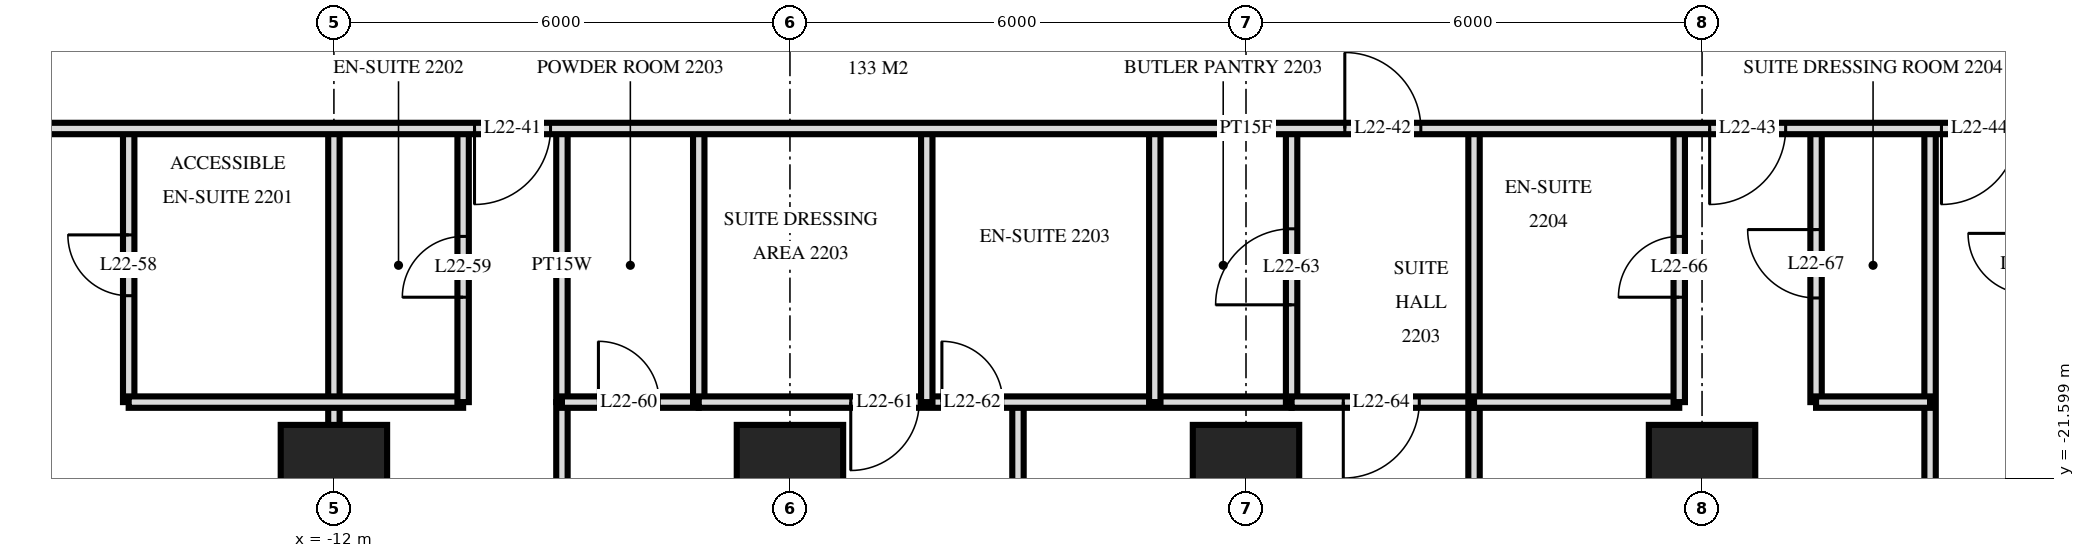
"""IFC4 building model, lengths in metres.
Left out: names, types, materials, properties, quantities, classifications, styles, units other than length and angle.
Written with IfcOpenShell. Run it as: python <this file> out.ifc"""

import sys

from ifc_helpers import new_model, si_unit, direction, frame, frame_2d, origin, origin_2d, place, context, subcontext, project, spatial, rectangle, extrude, element, fill, save


model = new_model("IFC4")
c1 = context("Model", 3, precision=1e-05, world=origin(), true_north=direction((0.0, 1.0)))
c2 = subcontext(c1, "Body", "Model", "MODEL_VIEW")
j1 = project(units=[si_unit("LENGTHUNIT", "METRE"), si_unit("PLANEANGLEUNIT", "RADIAN")], contexts=[c1])
p1 = place(None, origin())
s1 = spatial("IfcSite", under=j1, at=p1, CompositionType="ELEMENT")
p2 = place(p1, origin())
s2 = spatial("IfcBuilding", under=s1, at=p2, CompositionType="ELEMENT")
p3 = place(p2, frame((0.0, 0.0, 88.8)))
s3 = spatial("IfcBuildingStorey", under=s2, at=p3, CompositionType="ELEMENT", Elevation=88.8)
for number, where, z_axis, x_axis in (
    (1, (-12.0, -21.6, 0.0), (0.0, 0.0, 1.0), (1.0, 0.0, 0.0)),
    (2, (-6.0, -21.6, 0.0), (0.0, 0.0, 1.0), (1.0, 0.0, 0.0)),
    (3, (0.0, -21.6, 0.0), (0.0, 0.0, 1.0), (1.0, 0.0, 0.0)),
    (4, (6.0, -21.6, 0.0), (0.0, 0.0, 1.0), (1.0, 0.0, 0.0)),
):
    element("IfcColumn", number, at=place(p3, frame(where, z_axis=z_axis, x_axis=x_axis)), inside=s3, PredefinedType="COLUMN", context=c2, shape_type="SweptSolid", body=[
        extrude(rectangle(XDim=1.4, YDim=1.4, at=origin_2d()), origin(), (0.0, 0.0, 1.0), 3.6),
    ])
p4 = place(p3, frame((9.0, -29.22, 0.0), z_axis=(0.0, 0.0, 1.0), x_axis=(0.0, 1.0, 0.0)))
e5 = element("IfcWall", 5, at=p4, inside=s3, PredefinedType="PARTITIONING", context=c2, shape_type="SweptSolid", body=[
    extrude(rectangle(XDim=12.22, YDim=0.15, at=frame_2d((6.11, 0.0))), origin(), (0.0, 0.0, 1.0), 3.32),
])
p5 = place(p3, frame((7.5, -20.6, 0.0), z_axis=(0.0, 0.0, 1.0), x_axis=(0.0, 1.0, 0.0)))
e6 = element("IfcWall", 6, at=p5, inside=s3, PredefinedType="PARTITIONING", context=c2, shape_type="SweptSolid", body=[
    extrude(rectangle(XDim=3.6, YDim=0.15, at=frame_2d((1.8, 0.0))), origin(), (0.0, 0.0, 1.0), 3.32),
])
p6 = place(p5, frame((1.37, 0.0, 0.0)))
e7 = element("IfcOpeningElement", 7, at=p6, cuts=e6, PredefinedType="OPENING", context=c2, shape_type="SweptSolid", body=[
    extrude(rectangle(XDim=0.9, YDim=2.1, at=frame_2d((0.45, 1.05))), frame((0.0, 0.085, 0.0), z_axis=(0.0, -1.0, 0.0), x_axis=(1.0, 0.0, 0.0)), (0.0, 0.0, 1.0), 0.17),
])
p7 = place(p3, frame((5.7, -20.6, 0.0), z_axis=(0.0, 0.0, 1.0), x_axis=(0.0, 1.0, 0.0)))
e8 = element("IfcWall", 8, at=p7, inside=s3, PredefinedType="PARTITIONING", context=c2, shape_type="SweptSolid", body=[
    extrude(rectangle(XDim=3.6, YDim=0.15, at=frame_2d((1.8, 0.0))), origin(), (0.0, 0.0, 1.0), 3.32),
])
p8 = place(p7, frame((1.38, 0.0, 0.0)))
e9 = element("IfcOpeningElement", 9, at=p8, cuts=e8, PredefinedType="OPENING", context=c2, shape_type="SweptSolid", body=[
    extrude(rectangle(XDim=0.8, YDim=2.1, at=frame_2d((0.4, 1.05))), frame((0.0, 0.085, 0.0), z_axis=(0.0, -1.0, 0.0), x_axis=(1.0, 0.0, 0.0)), (0.0, 0.0, 1.0), 0.17),
])
p9 = place(p3, frame((3.0, -20.6, 0.0), z_axis=(0.0, 0.0, 1.0), x_axis=(0.0, 1.0, 0.0)))
e10 = element("IfcWall", 10, at=p9, inside=s3, PredefinedType="PARTITIONING", context=c2, shape_type="SweptSolid", body=[
    extrude(rectangle(XDim=3.6, YDim=0.15, at=frame_2d((1.8, 0.0))), origin(), (0.0, 0.0, 1.0), 3.32),
])
p10 = place(p3, frame((3.0, -29.22, 0.0), z_axis=(0.0, 0.0, 1.0), x_axis=(0.0, 1.0, 0.0)))
e11 = element("IfcWall", 11, at=p10, inside=s3, PredefinedType="PARTITIONING", context=c2, shape_type="SweptSolid", body=[
    extrude(rectangle(XDim=8.62, YDim=0.15, at=frame_2d((4.31, 0.0))), origin(), (0.0, 0.0, 1.0), 3.32),
])
p11 = place(p3, frame((0.6, -20.6, 0.0), z_axis=(0.0, 0.0, 1.0), x_axis=(0.0, 1.0, 0.0)))
e12 = element("IfcWall", 12, at=p11, inside=s3, PredefinedType="PARTITIONING", context=c2, shape_type="SweptSolid", body=[
    extrude(rectangle(XDim=3.6, YDim=0.15, at=frame_2d((1.8, 0.0))), origin(), (0.0, 0.0, 1.0), 3.32),
])
p12 = place(p11, frame((1.28, 0.0, 0.0)))
e13 = element("IfcOpeningElement", 13, at=p12, cuts=e12, PredefinedType="OPENING", context=c2, shape_type="SweptSolid", body=[
    extrude(rectangle(XDim=1.0, YDim=2.1, at=frame_2d((0.5, 1.05))), frame((0.0, 0.085, 0.0), z_axis=(0.0, -1.0, 0.0), x_axis=(1.0, 0.0, 0.0)), (0.0, 0.0, 1.0), 0.17),
])
p13 = place(p3, frame((-1.2, -20.6, 0.0), z_axis=(0.0, 0.0, 1.0), x_axis=(0.0, 1.0, 0.0)))
e14 = element("IfcWall", 14, at=p13, inside=s3, PredefinedType="PARTITIONING", context=c2, shape_type="SweptSolid", body=[
    extrude(rectangle(XDim=3.6, YDim=0.15, at=frame_2d((1.8, 0.0))), origin(), (0.0, 0.0, 1.0), 3.32),
])
p14 = place(p3, frame((-3.0, -29.22, 0.0), z_axis=(0.0, 0.0, 1.0), x_axis=(0.0, 1.0, 0.0)))
e15 = element("IfcWall", 15, at=p14, inside=s3, PredefinedType="PARTITIONING", context=c2, shape_type="SweptSolid", body=[
    extrude(rectangle(XDim=8.62, YDim=0.15, at=frame_2d((4.31, 0.0))), origin(), (0.0, 0.0, 1.0), 3.32),
])
p15 = place(p14, frame((3.77, 0.0, 0.0)))
e16 = element("IfcOpeningElement", 16, at=p15, cuts=e15, PredefinedType="OPENING", context=c2, shape_type="SweptSolid", body=[
    extrude(rectangle(XDim=0.9, YDim=2.1, at=frame_2d((0.45, 1.05))), frame((0.0, 0.085, 0.0), z_axis=(0.0, -1.0, 0.0), x_axis=(1.0, 0.0, 0.0)), (0.0, 0.0, 1.0), 0.17),
])
p16 = place(p3, frame((-4.2, -20.6, 0.0), z_axis=(0.0, 0.0, 1.0), x_axis=(0.0, 1.0, 0.0)))
e17 = element("IfcWall", 17, at=p16, inside=s3, PredefinedType="PARTITIONING", context=c2, shape_type="SweptSolid", body=[
    extrude(rectangle(XDim=3.6, YDim=0.15, at=frame_2d((1.8, 0.0))), origin(), (0.0, 0.0, 1.0), 3.32),
])
p17 = place(p3, frame((-7.2, -20.6, 0.0), z_axis=(0.0, 0.0, 1.0), x_axis=(0.0, 1.0, 0.0)))
e18 = element("IfcWall", 18, at=p17, inside=s3, PredefinedType="PLUMBINGWALL", context=c2, shape_type="SweptSolid", body=[
    extrude(rectangle(XDim=3.6, YDim=0.15, at=frame_2d((1.8, 0.0))), origin(), (0.0, 0.0, 1.0), 3.32),
])
p18 = place(p3, frame((-9.0, -29.22, 0.0), z_axis=(0.0, 0.0, 1.0), x_axis=(0.0, 1.0, 0.0)))
e19 = element("IfcWall", 19, at=p18, inside=s3, PredefinedType="PARTITIONING", context=c2, shape_type="SweptSolid", body=[
    extrude(rectangle(XDim=8.62, YDim=0.15, at=frame_2d((4.31, 0.0))), origin(), (0.0, 0.0, 1.0), 3.32),
])
p19 = place(p3, frame((-9.0, -20.6, 0.0), z_axis=(0.0, 0.0, 1.0), x_axis=(0.0, 1.0, 0.0)))
e20 = element("IfcWall", 20, at=p19, inside=s3, PredefinedType="PLUMBINGWALL", context=c2, shape_type="SweptSolid", body=[
    extrude(rectangle(XDim=3.6, YDim=0.15, at=frame_2d((1.8, 0.0))), origin(), (0.0, 0.0, 1.0), 3.32),
])
p20 = place(p3, frame((-10.3, -20.6, 0.0), z_axis=(0.0, 0.0, 1.0), x_axis=(0.0, 1.0, 0.0)))
e21 = element("IfcWall", 21, at=p20, inside=s3, PredefinedType="PARTITIONING", context=c2, shape_type="SweptSolid", body=[
    extrude(rectangle(XDim=3.6, YDim=0.15, at=frame_2d((1.8, 0.0))), origin(), (0.0, 0.0, 1.0), 3.32),
])
p21 = place(p20, frame((1.38, 0.0, 0.0)))
e22 = element("IfcOpeningElement", 22, at=p21, cuts=e21, PredefinedType="OPENING", context=c2, shape_type="SweptSolid", body=[
    extrude(rectangle(XDim=0.8, YDim=2.1, at=frame_2d((0.4, 1.05))), frame((0.0, 0.085, 0.0), z_axis=(0.0, -1.0, 0.0), x_axis=(1.0, 0.0, 0.0)), (0.0, 0.0, 1.0), 0.17),
])
p22 = place(p3, frame((-12.0, -29.22, 0.0), z_axis=(0.0, 0.0, 1.0), x_axis=(0.0, 1.0, 0.0)))
e23 = element("IfcWall", 23, at=p22, inside=s3, PredefinedType="PARTITIONING", context=c2, shape_type="SweptSolid", body=[
    extrude(rectangle(XDim=12.22, YDim=0.15, at=frame_2d((6.11, 0.0))), origin(), (0.0, 0.0, 1.0), 3.32),
])
p23 = place(p3, frame((-14.7, -20.6, 0.0), z_axis=(0.0, 0.0, 1.0), x_axis=(0.0, 1.0, 0.0)))
e24 = element("IfcWall", 24, at=p23, inside=s3, PredefinedType="PARTITIONING", context=c2, shape_type="SweptSolid", body=[
    extrude(rectangle(XDim=3.6, YDim=0.15, at=frame_2d((1.8, 0.0))), origin(), (0.0, 0.0, 1.0), 3.32),
])
p24 = place(p23, frame((1.4, 0.0, 0.0)))
e25 = element("IfcOpeningElement", 25, at=p24, cuts=e24, PredefinedType="OPENING", context=c2, shape_type="SweptSolid", body=[
    extrude(rectangle(XDim=0.8, YDim=2.1, at=frame_2d((0.4, 1.05))), frame((0.0, 0.085, 0.0), z_axis=(0.0, -1.0, 0.0), x_axis=(1.0, 0.0, 0.0)), (0.0, 0.0, 1.0), 0.17),
])
p25 = place(p3, frame((0.6, -20.6, 0.0), z_axis=(0.0, 0.0, 1.0), x_axis=(1.0, 0.0, 0.0)))
e26 = element("IfcWall", 26, at=p25, inside=s3, PredefinedType="PARTITIONING", context=c2, shape_type="SweptSolid", body=[
    extrude(rectangle(XDim=2.4, YDim=0.15, at=frame_2d((1.2, 0.0))), origin(), (0.0, 0.0, 1.0), 3.32),
])
p26 = place(p25, frame((0.68, 0.0, 0.0)))
e27 = element("IfcOpeningElement", 27, at=p26, cuts=e26, PredefinedType="OPENING", context=c2, shape_type="SweptSolid", body=[
    extrude(rectangle(XDim=1.0, YDim=2.1, at=frame_2d((0.5, 1.05))), frame((0.0, 0.085, 0.0), z_axis=(0.0, -1.0, 0.0), x_axis=(1.0, 0.0, 0.0)), (0.0, 0.0, 1.0), 0.17),
])
p27 = place(p3, frame((-14.7, -20.6, 0.0), z_axis=(0.0, 0.0, 1.0), x_axis=(1.0, 0.0, 0.0)))
e28 = element("IfcWall", 28, at=p27, inside=s3, PredefinedType="PARTITIONING", context=c2, shape_type="SweptSolid", body=[
    extrude(rectangle(XDim=4.4, YDim=0.15, at=frame_2d((2.2, 0.0))), origin(), (0.0, 0.0, 1.0), 3.32),
])
p28 = place(p3, frame((-7.2, -20.6, 0.0), z_axis=(0.0, 0.0, 1.0), x_axis=(1.0, 0.0, 0.0)))
e29 = element("IfcWall", 29, at=p28, inside=s3, PredefinedType="PARTITIONING", context=c2, shape_type="SweptSolid", body=[
    extrude(rectangle(XDim=7.8, YDim=0.15, at=frame_2d((3.9, 0.0))), origin(), (0.0, 0.0, 1.0), 3.32),
])
p29 = place(p28, frame((2.0, 0.0, 0.0)))
e30 = element("IfcOpeningElement", 30, at=p29, cuts=e29, PredefinedType="OPENING", context=c2, shape_type="SweptSolid", body=[
    extrude(rectangle(XDim=0.9, YDim=2.1, at=frame_2d((0.45, 1.05))), frame((0.0, 0.085, 0.0), z_axis=(0.0, -1.0, 0.0), x_axis=(1.0, 0.0, 0.0)), (0.0, 0.0, 1.0), 0.17),
])
p30 = place(p28, frame((3.199, 0.0, 0.0)))
e31 = element("IfcOpeningElement", 31, at=p30, cuts=e29, PredefinedType="OPENING", context=c2, shape_type="SweptSolid", body=[
    extrude(rectangle(XDim=0.8, YDim=2.1, at=frame_2d((0.4, 1.05))), frame((0.0, 0.085, 0.0), z_axis=(0.0, -1.0, 0.0), x_axis=(1.0, 0.0, 0.0)), (0.0, 0.0, 1.0), 0.17),
])
p31 = place(p3, frame((3.0, -20.6, 0.0), z_axis=(0.0, 0.0, 1.0), x_axis=(1.0, 0.0, 0.0)))
e32 = element("IfcWall", 32, at=p31, inside=s3, PredefinedType="PARTITIONING", context=c2, shape_type="SweptSolid", body=[
    extrude(rectangle(XDim=2.7, YDim=0.15, at=frame_2d((1.35, 0.0))), origin(), (0.0, 0.0, 1.0), 3.32),
])
p32 = place(p3, frame((7.5, -20.6, 0.0), z_axis=(0.0, 0.0, 1.0), x_axis=(1.0, 0.0, 0.0)))
e33 = element("IfcWall", 33, at=p32, inside=s3, PredefinedType="PARTITIONING", context=c2, shape_type="SweptSolid", body=[
    extrude(rectangle(XDim=1.5, YDim=0.15, at=frame_2d((0.75, 0.0))), origin(), (0.0, 0.0, 1.0), 3.32),
])
p33 = place(p3, frame((-9.0, -20.6, 0.0), z_axis=(0.0, 0.0, 1.0), x_axis=(1.0, 0.0, 0.0)))
e34 = element("IfcWall", 34, at=p33, inside=s3, PredefinedType="PLUMBINGWALL", context=c2, shape_type="SweptSolid", body=[
    extrude(rectangle(XDim=1.8, YDim=0.15, at=frame_2d((0.9, 0.0))), origin(), (0.0, 0.0, 1.0), 3.32),
])
p34 = place(p33, frame((0.48, 0.0, 0.0)))
e35 = element("IfcOpeningElement", 35, at=p34, cuts=e34, PredefinedType="OPENING", context=c2, shape_type="SweptSolid", body=[
    extrude(rectangle(XDim=0.8, YDim=2.1, at=frame_2d((0.4, 1.05))), frame((0.0, 0.085, 0.0), z_axis=(0.0, -1.0, 0.0), x_axis=(1.0, 0.0, 0.0)), (0.0, 0.0, 1.0), 0.17),
])
p35 = place(p3, frame((-33.12, -17.0, 0.0), z_axis=(0.0, 0.0, 1.0), x_axis=(1.0, 0.0, 0.0)))
e36 = element("IfcWall", 36, at=p35, inside=s3, PredefinedType="PARTITIONING", context=c2, shape_type="SweptSolid", body=[
    extrude(rectangle(XDim=66.24, YDim=0.15, at=frame_2d((33.12, 0.0))), origin(), (0.0, 0.0, 1.0), 3.32),
])
p36 = place(p35, frame((16.27, 0.0, 0.0)))
e37 = element("IfcOpeningElement", 37, at=p36, cuts=e36, PredefinedType="OPENING", context=c2, shape_type="SweptSolid", body=[
    extrude(rectangle(XDim=1.0, YDim=2.1, at=frame_2d((0.5, 1.05))), frame((0.0, 0.085, 0.0), z_axis=(0.0, -1.0, 0.0), x_axis=(1.0, 0.0, 0.0)), (0.0, 0.0, 1.0), 0.17),
])
p37 = place(p35, frame((22.97, 0.0, 0.0)))
e38 = element("IfcOpeningElement", 38, at=p37, cuts=e36, PredefinedType="OPENING", context=c2, shape_type="SweptSolid", body=[
    extrude(rectangle(XDim=1.0, YDim=2.1, at=frame_2d((0.5, 1.05))), frame((0.0, 0.085, 0.0), z_axis=(0.0, -1.0, 0.0), x_axis=(1.0, 0.0, 0.0)), (0.0, 0.0, 1.0), 0.17),
])
p38 = place(p35, frame((34.42, 0.0, 0.0)))
e39 = element("IfcOpeningElement", 39, at=p38, cuts=e36, PredefinedType="OPENING", context=c2, shape_type="SweptSolid", body=[
    extrude(rectangle(XDim=1.0, YDim=2.1, at=frame_2d((0.5, 1.05))), frame((0.0, 0.085, 0.0), z_axis=(0.0, -1.0, 0.0), x_axis=(1.0, 0.0, 0.0)), (0.0, 0.0, 1.0), 0.17),
])
p39 = place(p35, frame((39.22, 0.0, 0.0)))
e40 = element("IfcOpeningElement", 40, at=p39, cuts=e36, PredefinedType="OPENING", context=c2, shape_type="SweptSolid", body=[
    extrude(rectangle(XDim=1.0, YDim=2.1, at=frame_2d((0.5, 1.05))), frame((0.0, 0.085, 0.0), z_axis=(0.0, -1.0, 0.0), x_axis=(1.0, 0.0, 0.0)), (0.0, 0.0, 1.0), 0.17),
])
p40 = place(p35, frame((42.27, 0.0, 0.0)))
e41 = element("IfcOpeningElement", 41, at=p40, cuts=e36, PredefinedType="OPENING", context=c2, shape_type="SweptSolid", body=[
    extrude(rectangle(XDim=1.0, YDim=2.1, at=frame_2d((0.5, 1.05))), frame((0.0, 0.085, 0.0), z_axis=(0.0, -1.0, 0.0), x_axis=(1.0, 0.0, 0.0)), (0.0, 0.0, 1.0), 0.17),
])
p41 = place(p35, frame((45.82, 0.0, 0.0)))
e42 = element("IfcOpeningElement", 42, at=p41, cuts=e36, PredefinedType="OPENING", context=c2, shape_type="SweptSolid", body=[
    extrude(rectangle(XDim=1.0, YDim=2.1, at=frame_2d((0.5, 1.05))), frame((0.0, 0.085, 0.0), z_axis=(0.0, -1.0, 0.0), x_axis=(1.0, 0.0, 0.0)), (0.0, 0.0, 1.0), 0.17),
])
p42 = place(p35, frame((13.42, 0.0, 0.0)))
e43 = element("IfcOpeningElement", 43, at=p42, cuts=e36, PredefinedType="OPENING", context=c2, shape_type="SweptSolid", body=[
    extrude(rectangle(XDim=1.0, YDim=2.1, at=frame_2d((0.5, 1.05))), frame((0.0, 0.085, 0.0), z_axis=(0.0, -1.0, 0.0), x_axis=(1.0, 0.0, 0.0)), (0.0, 0.0, 1.0), 0.17),
])
p43 = place(p35, frame((54.82, 0.0, 0.0)))
e44 = element("IfcOpeningElement", 44, at=p43, cuts=e36, PredefinedType="OPENING", context=c2, shape_type="SweptSolid", body=[
    extrude(rectangle(XDim=1.0, YDim=2.1, at=frame_2d((0.5, 1.05))), frame((0.0, 0.085, 0.0), z_axis=(0.0, -1.0, 0.0), x_axis=(1.0, 0.0, 0.0)), (0.0, 0.0, 1.0), 0.17),
])
p44 = place(p37, frame((0.5, 0.0, 0.0), z_axis=(0.0, 0.0, 1.0), x_axis=(-1.0, 0.0, 0.0)))
e45 = element("IfcDoor", 45, at=p44, inside=s3, OperationType="SINGLE_SWING_LEFT", PredefinedType="DOOR", context=c2, shape_type="SweptSolid", body=[
    extrude(rectangle(XDim=1.0, YDim=2.1, at=frame_2d((0.0, 1.05))), frame((0.0, -0.025, 0.0), z_axis=(0.0, 1.0, 0.0), x_axis=(-1.0, 0.0, 0.0)), (0.0, 0.0, 1.0), 0.05),
])
fill(e38, e45)
p45 = place(p38, origin())
e46 = element("IfcDoor", 46, at=p45, inside=s3, OperationType="SINGLE_SWING_RIGHT", PredefinedType="DOOR", context=c2, shape_type="SweptSolid", body=[
    extrude(rectangle(XDim=1.0, YDim=2.1, at=frame_2d((0.5, 1.05))), frame((0.0, 0.025, 0.0), z_axis=(0.0, -1.0, 0.0), x_axis=(1.0, 0.0, 0.0)), (0.0, 0.0, 1.0), 0.05),
])
fill(e39, e46)
p46 = place(p39, frame((0.5, 0.0, 0.0), z_axis=(0.0, 0.0, 1.0), x_axis=(-1.0, 0.0, 0.0)))
e47 = element("IfcDoor", 47, at=p46, inside=s3, OperationType="SINGLE_SWING_LEFT", PredefinedType="DOOR", context=c2, shape_type="SweptSolid", body=[
    extrude(rectangle(XDim=1.0, YDim=2.1, at=frame_2d((0.0, 1.05))), frame((0.0, -0.025, 0.0), z_axis=(0.0, 1.0, 0.0), x_axis=(-1.0, 0.0, 0.0)), (0.0, 0.0, 1.0), 0.05),
])
fill(e40, e47)
p47 = place(p40, frame((0.5, 0.0, 0.0), z_axis=(0.0, 0.0, 1.0), x_axis=(-1.0, 0.0, 0.0)))
e48 = element("IfcDoor", 48, at=p47, inside=s3, OperationType="SINGLE_SWING_LEFT", PredefinedType="DOOR", context=c2, shape_type="SweptSolid", body=[
    extrude(rectangle(XDim=1.0, YDim=2.1, at=frame_2d((0.0, 1.05))), frame((0.0, -0.025, 0.0), z_axis=(0.0, 1.0, 0.0), x_axis=(-1.0, 0.0, 0.0)), (0.0, 0.0, 1.0), 0.05),
])
fill(e41, e48)
p48 = place(p24, origin())
e49 = element("IfcDoor", 49, at=p48, inside=s3, OperationType="SINGLE_SWING_LEFT", PredefinedType="DOOR", context=c2, shape_type="SweptSolid", body=[
    extrude(rectangle(XDim=0.8, YDim=2.1, at=frame_2d((0.4, 1.05))), frame((0.0, 0.025, 0.0), z_axis=(0.0, -1.0, 0.0), x_axis=(1.0, 0.0, 0.0)), (0.0, 0.0, 1.0), 0.05),
])
fill(e25, e49)
p49 = place(p21, origin())
e50 = element("IfcDoor", 50, at=p49, inside=s3, OperationType="SINGLE_SWING_RIGHT", PredefinedType="DOOR", context=c2, shape_type="SweptSolid", body=[
    extrude(rectangle(XDim=0.8, YDim=2.1, at=frame_2d((0.4, 1.05))), frame((0.0, 0.025, 0.0), z_axis=(0.0, -1.0, 0.0), x_axis=(1.0, 0.0, 0.0)), (0.0, 0.0, 1.0), 0.05),
])
fill(e22, e50)
p50 = place(p34, origin())
e51 = element("IfcDoor", 51, at=p50, inside=s3, OperationType="SINGLE_SWING_RIGHT", PredefinedType="DOOR", context=c2, shape_type="SweptSolid", body=[
    extrude(rectangle(XDim=0.8, YDim=2.1, at=frame_2d((0.4, 1.05))), frame((0.0, 0.025, 0.0), z_axis=(0.0, -1.0, 0.0), x_axis=(1.0, 0.0, 0.0)), (0.0, 0.0, 1.0), 0.05),
])
fill(e35, e51)
p51 = place(p29, frame((0.45, 0.0, 0.0), z_axis=(0.0, 0.0, 1.0), x_axis=(-1.0, 0.0, 0.0)))
e52 = element("IfcDoor", 52, at=p51, inside=s3, OperationType="SINGLE_SWING_LEFT", PredefinedType="DOOR", context=c2, shape_type="SweptSolid", body=[
    extrude(rectangle(XDim=0.9, YDim=2.1, at=frame_2d((0.0, 1.05))), frame((0.0, -0.025, 0.0), z_axis=(0.0, 1.0, 0.0), x_axis=(-1.0, 0.0, 0.0)), (0.0, 0.0, 1.0), 0.05),
])
fill(e30, e52)
p52 = place(p30, origin())
e53 = element("IfcDoor", 53, at=p52, inside=s3, OperationType="SINGLE_SWING_RIGHT", PredefinedType="DOOR", context=c2, shape_type="SweptSolid", body=[
    extrude(rectangle(XDim=0.8, YDim=2.1, at=frame_2d((0.4, 1.05))), frame((0.0, 0.025, 0.0), z_axis=(0.0, -1.0, 0.0), x_axis=(1.0, 0.0, 0.0)), (0.0, 0.0, 1.0), 0.05),
])
fill(e31, e53)
p53 = place(p12, origin())
e54 = element("IfcDoor", 54, at=p53, inside=s3, OperationType="SINGLE_SWING_RIGHT", PredefinedType="DOOR", context=c2, shape_type="SweptSolid", body=[
    extrude(rectangle(XDim=1.0, YDim=2.1, at=frame_2d((0.5, 1.05))), frame((0.0, 0.025, 0.0), z_axis=(0.0, -1.0, 0.0), x_axis=(1.0, 0.0, 0.0)), (0.0, 0.0, 1.0), 0.05),
])
fill(e13, e54)
p54 = place(p26, frame((0.5, 0.0, 0.0), z_axis=(0.0, 0.0, 1.0), x_axis=(-1.0, 0.0, 0.0)))
e55 = element("IfcDoor", 55, at=p54, inside=s3, OperationType="SINGLE_SWING_LEFT", PredefinedType="DOOR", context=c2, shape_type="SweptSolid", body=[
    extrude(rectangle(XDim=1.0, YDim=2.1, at=frame_2d((0.0, 1.05))), frame((0.0, -0.025, 0.0), z_axis=(0.0, 1.0, 0.0), x_axis=(-1.0, 0.0, 0.0)), (0.0, 0.0, 1.0), 0.05),
])
fill(e27, e55)
p55 = place(p8, origin())
e56 = element("IfcDoor", 56, at=p55, inside=s3, OperationType="SINGLE_SWING_RIGHT", PredefinedType="DOOR", context=c2, shape_type="SweptSolid", body=[
    extrude(rectangle(XDim=0.8, YDim=2.1, at=frame_2d((0.4, 1.05))), frame((0.0, 0.025, 0.0), z_axis=(0.0, -1.0, 0.0), x_axis=(1.0, 0.0, 0.0)), (0.0, 0.0, 1.0), 0.05),
])
fill(e9, e56)
p56 = place(p6, origin())
e57 = element("IfcDoor", 57, at=p56, inside=s3, OperationType="SINGLE_SWING_LEFT", PredefinedType="DOOR", context=c2, shape_type="SweptSolid", body=[
    extrude(rectangle(XDim=0.9, YDim=2.1, at=frame_2d((0.45, 1.05))), frame((0.0, 0.025, 0.0), z_axis=(0.0, -1.0, 0.0), x_axis=(1.0, 0.0, 0.0)), (0.0, 0.0, 1.0), 0.05),
])
fill(e7, e57)
save(model, sys.argv[1])
